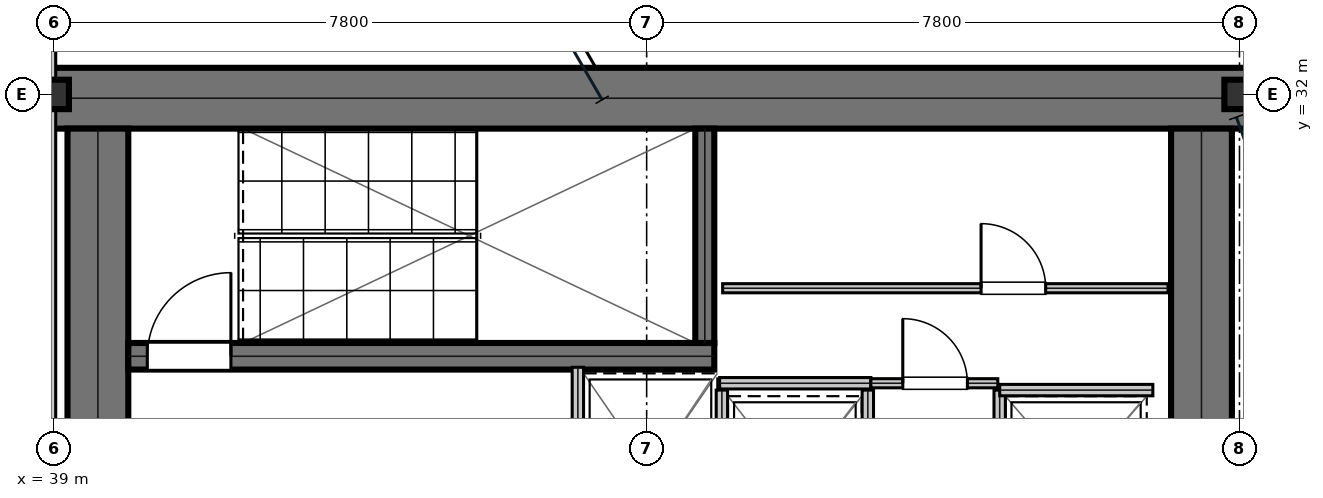
"""IFC4 building model, lengths in metres.
Left out: names, types, materials, properties, quantities, classifications, styles, units other than length and angle.
Written with IfcOpenShell. Run it as: python <this file> out.ifc"""

import sys

from ifc_helpers import new_model, si_unit, direction, frame, frame_2d, origin, origin_2d, place, context, subcontext, project, spatial, rectangle, i_section, extrude, element, fill, save


model = new_model("IFC4")
c1 = context("Model", 3, precision=1e-05, world=origin(), true_north=direction((0.0, 1.0)))
c2 = subcontext(c1, "Body", "Model", "MODEL_VIEW")
j1 = project(units=[si_unit("LENGTHUNIT", "METRE"), si_unit("PLANEANGLEUNIT", "RADIAN")], contexts=[c1])
p1 = place(None, origin())
s1 = spatial("IfcSite", under=j1, at=p1, CompositionType="ELEMENT")
p2 = place(p1, origin())
s2 = spatial("IfcBuilding", under=s1, at=p2, CompositionType="ELEMENT")
p3 = place(p2, frame((0.0, 0.0, 169.5)))
s3 = spatial("IfcBuildingStorey", under=s2, at=p3, CompositionType="ELEMENT", Elevation=169.5)
p4 = place(p3, frame((38.8, 31.95, 0.0), z_axis=(0.0, 0.0, 1.0), x_axis=(1.0, 0.0, 0.0)))
e1 = element("IfcWall", 1, at=p4, inside=s3, PredefinedType="SHEAR", context=c2, shape_type="SweptSolid", body=[
    extrude(rectangle(XDim=16.0, YDim=0.8, at=frame_2d((8.0, 0.0))), origin(), (0.0, 0.0, 1.0), 3.81),
])
p5 = place(p3, frame((39.58, 25.4, 0.0), z_axis=(0.0, 0.0, 1.0), x_axis=(0.0, 1.0, 0.0)))
e2 = element("IfcWall", 2, at=p5, inside=s3, PredefinedType="SHEAR", context=c2, shape_type="SweptSolid", body=[
    extrude(rectangle(XDim=6.15, YDim=0.8, at=frame_2d((3.075, 0.0))), origin(), (0.0, 0.0, 1.0), 3.81),
])
p6 = place(p3, frame((54.1, 16.45, 0.0), z_axis=(0.0, 0.0, 1.0), x_axis=(0.0, 1.0, 0.0)))
e3 = element("IfcWall", 3, at=p6, inside=s3, PredefinedType="SHEAR", context=c2, shape_type="SweptSolid", body=[
    extrude(rectangle(XDim=15.1, YDim=0.8, at=frame_2d((7.55, 0.0))), origin(), (0.0, 0.0, 1.0), 3.81),
])
p7 = place(p3, frame((39.98, 28.555, 0.0), z_axis=(0.0, 0.0, 1.0), x_axis=(1.0, 0.0, 0.0)))
e4 = element("IfcWall", 4, at=p7, inside=s3, PredefinedType="SHEAR", context=c2, shape_type="SweptSolid", body=[
    extrude(rectangle(XDim=7.71, YDim=0.35, at=frame_2d((3.855, 0.0))), origin(), (0.0, 0.0, 1.0), 3.81),
])
p8 = place(p7, frame((0.25, 0.0, 0.0)))
e5 = element("IfcOpeningElement", 5, at=p8, cuts=e4, PredefinedType="OPENING", context=c2, shape_type="SweptSolid", body=[
    extrude(rectangle(XDim=1.1, YDim=2.15, at=frame_2d((0.55, 1.075))), frame((0.0, 0.185, 0.0), z_axis=(0.0, -1.0, 0.0), x_axis=(1.0, 0.0, 0.0)), (0.0, 0.0, 1.0), 0.37),
])
p9 = place(p3, frame((47.565, 28.73, 0.0), z_axis=(0.0, 0.0, 1.0), x_axis=(0.0, 1.0, 0.0)))
e6 = element("IfcWall", 6, at=p9, inside=s3, PredefinedType="SHEAR", context=c2, shape_type="SweptSolid", body=[
    extrude(rectangle(XDim=2.82, YDim=0.25, at=frame_2d((1.41, 0.0))), origin(), (0.0, 0.0, 1.0), 3.81),
])
for number, where, z_axis, x_axis in (
    (7, (39.0, 32.0, 0.0), (0.0, 0.0, 1.0), (1.0, 0.0, 0.0)),
    (8, (54.6, 32.0, 0.0), (0.0, 0.0, 1.0), (1.0, 0.0, 0.0)),
):
    element("IfcColumn", number, at=place(p3, frame(where, z_axis=z_axis, x_axis=x_axis)), inside=s3, PredefinedType="COLUMN", context=c2, shape_type="SweptSolid", body=[
        extrude(i_section(OverallWidth=0.398, OverallDepth=0.387, WebThickness=0.021, FlangeThickness=0.033, at=origin_2d()), origin(), (0.0, 0.0, 1.0), 4.044),
    ])
p10 = place(p3, frame((45.895, 25.69, 0.0), z_axis=(0.0, 0.0, 1.0), x_axis=(0.0, 1.0, 0.0)))
e9 = element("IfcWall", 9, at=p10, inside=s3, PredefinedType="PARTITIONING", context=c2, shape_type="SweptSolid", body=[
    extrude(rectangle(XDim=2.72, YDim=0.15, at=frame_2d((1.36, 0.0))), origin(), (0.0, 0.0, 1.0), 3.81),
])
p11 = place(p10, frame((0.81, 0.0, 0.0)))
e10 = element("IfcOpeningElement", 10, at=p11, cuts=e9, PredefinedType="OPENING", context=c2, shape_type="SweptSolid", body=[
    extrude(rectangle(XDim=1.1, YDim=2.15, at=frame_2d((0.55, 1.075))), frame((0.0, 0.085, 0.0), z_axis=(0.0, -1.0, 0.0), x_axis=(1.0, 0.0, 0.0)), (0.0, 0.0, 1.0), 0.17),
])
for number, where, z_axis, x_axis in (
    (11, (47.79, 25.695, 0.0), (0.0, 0.0, 1.0), (0.0, 1.0, 0.0)),
    (12, (49.71, 25.695, 0.0), (0.0, 0.0, 1.0), (0.0, 1.0, 0.0)),
):
    element("IfcWall", number, at=place(p3, frame(where, z_axis=z_axis, x_axis=x_axis)), inside=s3, PredefinedType="PARTITIONING", context=c2, shape_type="SweptSolid", body=[
        extrude(rectangle(XDim=2.415, YDim=0.15, at=frame_2d((1.208, 0.0))), origin(), (0.0, 0.0, 1.0), 3.81),
    ])
p12 = place(p3, frame((51.445, 25.79, 0.0), z_axis=(0.0, 0.0, 1.0), x_axis=(0.0, 1.0, 0.0)))
e13 = element("IfcWall", 13, at=p12, inside=s3, PredefinedType="PARTITIONING", context=c2, shape_type="SweptSolid", body=[
    extrude(rectangle(XDim=2.32, YDim=0.15, at=frame_2d((1.16, 0.0))), origin(), (0.0, 0.0, 1.0), 3.81),
])
p13 = place(p12, frame((0.61, 0.0, 0.0)))
e14 = element("IfcOpeningElement", 14, at=p13, cuts=e13, PredefinedType="OPENING", context=c2, shape_type="SweptSolid", body=[
    extrude(rectangle(XDim=1.1, YDim=2.15, at=frame_2d((0.55, 1.075))), frame((0.0, 0.085, 0.0), z_axis=(0.0, -1.0, 0.0), x_axis=(1.0, 0.0, 0.0)), (0.0, 0.0, 1.0), 0.17),
])
p14 = place(p3, frame((51.445, 28.11, 0.0), z_axis=(0.0, 0.0, 1.0), x_axis=(1.0, 0.0, 0.0)))
e15 = element("IfcWall", 15, at=p14, inside=s3, PredefinedType="PARTITIONING", context=c2, shape_type="SweptSolid", body=[
    extrude(rectangle(XDim=2.015, YDim=0.15, at=frame_2d((1.007, 0.0))), origin(), (0.0, 0.0, 1.0), 3.81),
])
p15 = place(p3, frame((47.76, 28.2, 0.0), z_axis=(0.0, 0.0, 1.0), x_axis=(1.0, 0.0, 0.0)))
e16 = element("IfcWall", 16, at=p15, inside=s3, PredefinedType="PARTITIONING", context=c2, shape_type="SweptSolid", body=[
    extrude(rectangle(XDim=1.99, YDim=0.15, at=frame_2d((0.995, 0.0))), origin(), (0.0, 0.0, 1.0), 3.81),
])
p16 = place(p3, frame((49.75, 28.2, 0.0), z_axis=(0.0, 0.0, 1.0), x_axis=(1.0, 0.0, 0.0)))
e17 = element("IfcWall", 17, at=p16, inside=s3, PredefinedType="PARTITIONING", context=c2, shape_type="SweptSolid", body=[
    extrude(rectangle(XDim=1.67, YDim=0.12, at=frame_2d((0.835, 0.0))), origin(), (0.0, 0.0, 1.0), 3.81),
])
p17 = place(p16, frame((0.42, 0.0, 0.0)))
e18 = element("IfcOpeningElement", 18, at=p17, cuts=e17, PredefinedType="OPENING", context=c2, shape_type="SweptSolid", body=[
    extrude(rectangle(XDim=0.85, YDim=2.15, at=frame_2d((0.425, 1.075))), frame((0.0, 0.07, 0.0), z_axis=(0.0, -1.0, 0.0), x_axis=(1.0, 0.0, 0.0)), (0.0, 0.0, 1.0), 0.14),
])
p18 = place(p3, frame((47.8, 29.45, 0.0), z_axis=(0.0, 0.0, 1.0), x_axis=(1.0, 0.0, 0.0)))
e19 = element("IfcWall", 19, at=p18, inside=s3, PredefinedType="PARTITIONING", context=c2, shape_type="SweptSolid", body=[
    extrude(rectangle(XDim=5.86, YDim=0.12, at=frame_2d((2.93, 0.0))), origin(), (0.0, 0.0, 1.0), 3.81),
])
p19 = place(p18, frame((3.4, 0.0, 0.0)))
e20 = element("IfcOpeningElement", 20, at=p19, cuts=e19, PredefinedType="OPENING", context=c2, shape_type="SweptSolid", body=[
    extrude(rectangle(XDim=0.85, YDim=2.15, at=frame_2d((0.425, 1.075))), frame((0.0, 0.07, 0.0), z_axis=(0.0, -1.0, 0.0), x_axis=(1.0, 0.0, 0.0)), (0.0, 0.0, 1.0), 0.14),
])
p20 = place(p3, frame((38.95, 25.3, 0.0), z_axis=(0.0, 0.0, 1.0), x_axis=(0.0, 1.0, 0.0)))
e21 = element("IfcWall", 21, at=p20, inside=s3, PredefinedType="PARTITIONING", context=c2, shape_type="SweptSolid", body=[
    extrude(rectangle(XDim=8.165, YDim=0.15, at=frame_2d((4.083, 0.0))), origin(), (0.0, 0.0, 1.0), 3.19),
])
p21 = place(p17, origin())
e22 = element("IfcDoor", 22, at=p21, inside=s3, OperationType="SINGLE_SWING_LEFT", PredefinedType="DOOR", context=c2, shape_type="SweptSolid", body=[
    extrude(rectangle(XDim=0.85, YDim=2.15, at=frame_2d((0.425, 1.075))), frame((0.0, 0.025, 0.0), z_axis=(0.0, -1.0, 0.0), x_axis=(1.0, 0.0, 0.0)), (0.0, 0.0, 1.0), 0.05),
])
fill(e18, e22)
p22 = place(p19, origin())
e23 = element("IfcDoor", 23, at=p22, inside=s3, OperationType="SINGLE_SWING_LEFT", PredefinedType="DOOR", context=c2, shape_type="SweptSolid", body=[
    extrude(rectangle(XDim=0.85, YDim=2.15, at=frame_2d((0.425, 1.075))), frame((0.0, 0.025, 0.0), z_axis=(0.0, -1.0, 0.0), x_axis=(1.0, 0.0, 0.0)), (0.0, 0.0, 1.0), 0.05),
])
fill(e20, e23)
p23 = place(p8, origin())
e24 = element("IfcDoor", 24, at=p23, inside=s3, OperationType="SINGLE_SWING_RIGHT", PredefinedType="DOOR", context=c2, shape_type="SweptSolid", body=[
    extrude(rectangle(XDim=1.1, YDim=2.15, at=frame_2d((0.55, 1.075))), frame((0.0, 0.025, 0.0), z_axis=(0.0, -1.0, 0.0), x_axis=(1.0, 0.0, 0.0)), (0.0, 0.0, 1.0), 0.05),
])
fill(e5, e24)
save(model, sys.argv[1])
